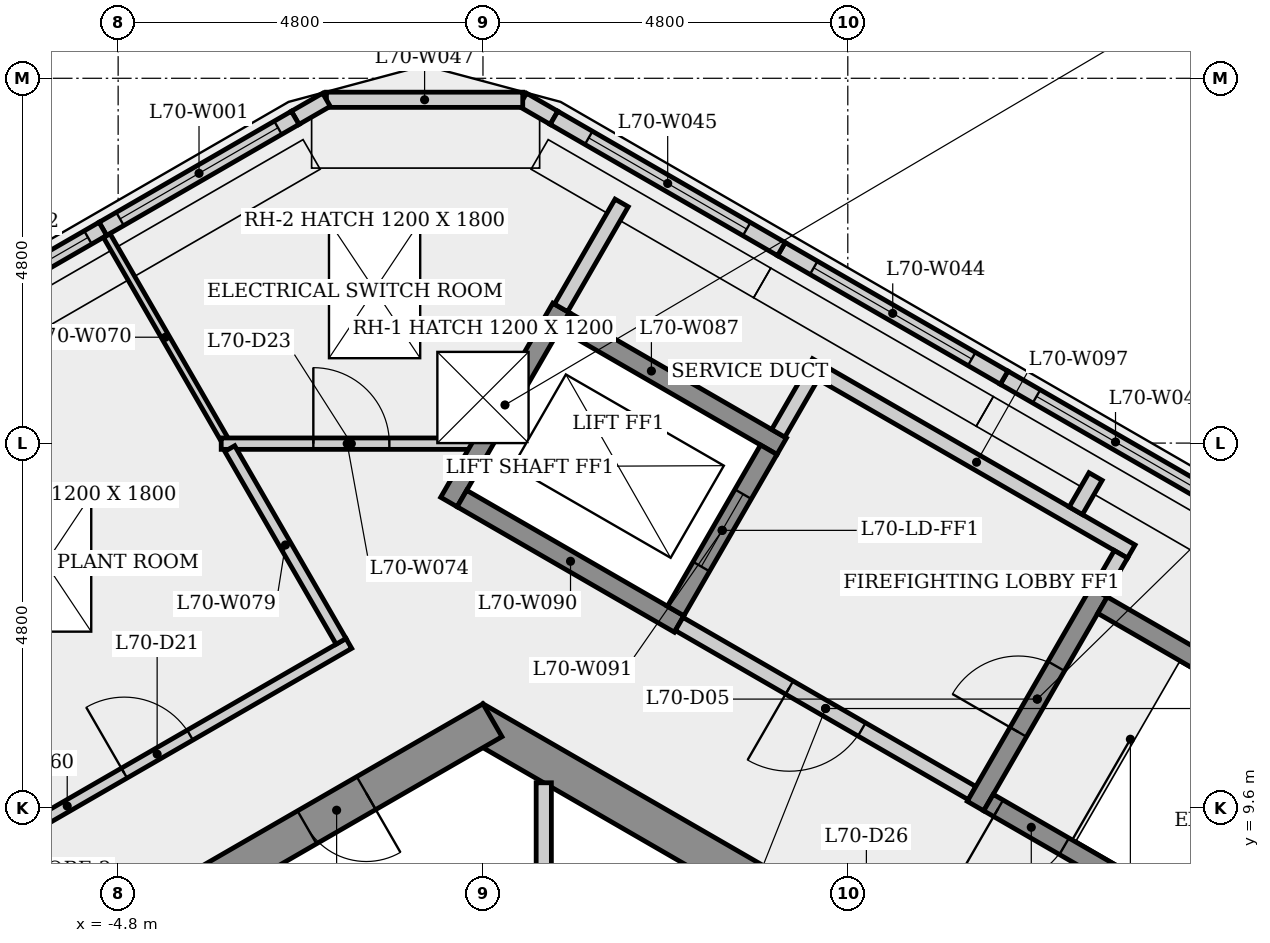
"""IFC4 building model, lengths in metres.
Left out: names, types, materials, properties, quantities, classifications, styles, units other than length and angle.
Written with IfcOpenShell. Run it as: python <this file> out.ifc"""

import sys

from ifc_helpers import new_model, si_unit, direction, frame, frame_2d, origin, origin_2d, place, context, subcontext, project, spatial, rectangle, extrude, element, fill, save


model = new_model("IFC4")
c1 = context("Model", 3, precision=1e-05, world=origin(), true_north=direction((0.0, 1.0)))
c2 = subcontext(c1, "Body", "Model", "MODEL_VIEW")
j1 = project(units=[si_unit("LENGTHUNIT", "METRE"), si_unit("PLANEANGLEUNIT", "RADIAN")], contexts=[c1])
p1 = place(None, origin())
s1 = spatial("IfcSite", under=j1, at=p1, CompositionType="ELEMENT")
p2 = place(p1, origin())
s2 = spatial("IfcBuilding", under=s1, at=p2, CompositionType="ELEMENT")
p3 = place(p2, frame((0.0, 0.0, 262.9)))
s3 = spatial("IfcBuildingStorey", under=s2, at=p3, CompositionType="ELEMENT", Elevation=262.9)
p4 = place(p3, frame((9.375, 5.268, 0.0), z_axis=(0.0, 0.0, 1.0), x_axis=(-0.866023993627, 0.500002442456, 0.0)))
e1 = element("IfcWall", 1, at=p4, inside=s3, PredefinedType="SHEAR", context=c2, shape_type="SweptSolid", body=[
    extrude(rectangle(XDim=10.97, YDim=0.5, at=frame_2d((5.485, 0.0))), origin(), (0.0, 0.0, 1.0), 4.8),
])
p5 = place(p4, frame((4.55, 0.0, 0.0)))
e2 = element("IfcOpeningElement", 2, at=p5, cuts=e1, PredefinedType="OPENING", context=c2, shape_type="SweptSolid", body=[
    extrude(rectangle(XDim=0.9, YDim=2.1, at=frame_2d((0.45, 1.05))), frame((0.0, 0.26, 0.0), z_axis=(0.0, -1.0, 0.0), x_axis=(1.0, 0.0, 0.0)), (0.0, 0.0, 1.0), 0.52),
])
p6 = place(p3, frame((0.125, 10.753, 0.0), z_axis=(0.0, 0.0, 1.0), x_axis=(-0.866023993627, -0.500002442456, 0.0)))
e3 = element("IfcWall", 3, at=p6, inside=s3, PredefinedType="SHEAR", context=c2, shape_type="SweptSolid", body=[
    extrude(rectangle(XDim=10.97, YDim=0.5, at=frame_2d((5.485, 0.0))), origin(), (0.0, 0.0, 1.0), 4.8),
])
p7 = place(p6, frame((7.113, 0.0, 0.0)))
e4 = element("IfcOpeningElement", 4, at=p7, cuts=e3, PredefinedType="OPENING", context=c2, shape_type="SweptSolid", body=[
    extrude(rectangle(XDim=0.9, YDim=2.1, at=frame_2d((0.45, 1.05))), frame((0.0, 0.26, 0.0), z_axis=(0.0, -1.0, 0.0), x_axis=(1.0, 0.0, 0.0)), (0.0, 0.0, 1.0), 0.52),
])
p8 = place(p6, frame((1.918, 0.0, 0.0)))
e5 = element("IfcOpeningElement", 5, at=p8, cuts=e3, PredefinedType="OPENING", context=c2, shape_type="SweptSolid", body=[
    extrude(rectangle(XDim=0.9, YDim=2.1, at=frame_2d((0.45, 1.05))), frame((0.0, 0.26, 0.0), z_axis=(0.0, -1.0, 0.0), x_axis=(1.0, 0.0, 0.0)), (0.0, 0.0, 1.0), 0.52),
])
p9 = place(p3, frame((-2.471, 18.68, 0.0), z_axis=(0.0, 0.0, 1.0), x_axis=(-0.866033925456, -0.499985239742, 0.0)))
e6 = element("IfcWall", 6, at=p9, inside=s3, PredefinedType="SOLIDWALL", context=c2, shape_type="SweptSolid", body=[
    extrude(rectangle(XDim=2.922, YDim=0.2, at=frame_2d((1.461, 0.0))), origin(), (0.0, 0.0, 1.0), 4.8),
])
p10 = place(p9, frame((0.261, 0.0, 0.8)))
e7 = element("IfcOpeningElement", 7, at=p10, cuts=e6, PredefinedType="OPENING", context=c2, shape_type="SweptSolid", body=[
    extrude(rectangle(XDim=2.4, YDim=2.4, at=frame_2d((1.2, 1.2))), frame((0.0, 0.11, 0.0), z_axis=(0.0, -1.0, 0.0), x_axis=(1.0, 0.0, 0.0)), (0.0, 0.0, 1.0), 0.22),
])
p11 = place(p3, frame((-5.001, 17.219, 0.0), z_axis=(0.0, 0.0, 1.0), x_axis=(-0.866027356191, -0.499996618317, 0.0)))
e8 = element("IfcWall", 8, at=p11, inside=s3, PredefinedType="SOLIDWALL", context=c2, shape_type="SweptSolid", body=[
    extrude(rectangle(XDim=2.852, YDim=0.2, at=frame_2d((1.426, 0.0))), origin(), (0.0, 0.0, 1.0), 4.8),
])
p12 = place(p11, frame((0.226, 0.0, 0.8)))
e9 = element("IfcOpeningElement", 9, at=p12, cuts=e8, PredefinedType="OPENING", context=c2, shape_type="SweptSolid", body=[
    extrude(rectangle(XDim=2.4, YDim=2.4, at=frame_2d((1.2, 1.2))), frame((0.0, 0.11, 0.0), z_axis=(0.0, -1.0, 0.0), x_axis=(1.0, 0.0, 0.0)), (0.0, 0.0, 1.0), 0.22),
])
p13 = place(p3, frame((9.788, 13.568, 0.0), z_axis=(0.0, 0.0, 1.0), x_axis=(-0.866051074803, 0.499955533855, 0.0)))
e10 = element("IfcWall", 10, at=p13, inside=s3, PredefinedType="SOLIDWALL", context=c2, shape_type="SweptSolid", body=[
    extrude(rectangle(XDim=3.385, YDim=0.2, at=frame_2d((1.692, 0.0))), origin(), (0.0, 0.0, 1.0), 4.8),
])
p14 = place(p13, frame((0.492, 0.0, 0.8)))
e11 = element("IfcOpeningElement", 11, at=p14, cuts=e10, PredefinedType="OPENING", context=c2, shape_type="SweptSolid", body=[
    extrude(rectangle(XDim=2.4, YDim=2.4, at=frame_2d((1.2, 1.2))), frame((0.0, 0.11, 0.0), z_axis=(0.0, -1.0, 0.0), x_axis=(1.0, 0.0, 0.0)), (0.0, 0.0, 1.0), 0.22),
])
p15 = place(p3, frame((6.856, 15.261, 0.0), z_axis=(0.0, 0.0, 1.0), x_axis=(-0.866010178455, 0.500026370116, 0.0)))
e12 = element("IfcWall", 12, at=p15, inside=s3, PredefinedType="SOLIDWALL", context=c2, shape_type="SweptSolid", body=[
    extrude(rectangle(XDim=3.384, YDim=0.2, at=frame_2d((1.692, 0.0))), origin(), (0.0, 0.0, 1.0), 4.8),
])
p16 = place(p15, frame((0.492, 0.0, 0.8)))
e13 = element("IfcOpeningElement", 13, at=p16, cuts=e12, PredefinedType="OPENING", context=c2, shape_type="SweptSolid", body=[
    extrude(rectangle(XDim=2.4, YDim=2.4, at=frame_2d((1.2, 1.2))), frame((0.0, 0.11, 0.0), z_axis=(0.0, -1.0, 0.0), x_axis=(1.0, 0.0, 0.0)), (0.0, 0.0, 1.0), 0.22),
])
p17 = place(p3, frame((3.926, 16.953, 0.0), z_axis=(0.0, 0.0, 1.0), x_axis=(-0.866046690806, 0.499963127985, 0.0)))
e14 = element("IfcWall", 14, at=p17, inside=s3, PredefinedType="SOLIDWALL", context=c2, shape_type="SweptSolid", body=[
    extrude(rectangle(XDim=3.454, YDim=0.2, at=frame_2d((1.727, 0.0))), origin(), (0.0, 0.0, 1.0), 4.8),
])
p18 = place(p17, frame((0.527, 0.0, 0.8)))
e15 = element("IfcOpeningElement", 15, at=p18, cuts=e14, PredefinedType="OPENING", context=c2, shape_type="SweptSolid", body=[
    extrude(rectangle(XDim=2.4, YDim=2.4, at=frame_2d((1.2, 1.2))), frame((0.0, 0.11, 0.0), z_axis=(0.0, -1.0, 0.0), x_axis=(1.0, 0.0, 0.0)), (0.0, 0.0, 1.0), 0.22),
])
p19 = place(p3, frame((0.935, 18.68, 0.0), z_axis=(0.0, 0.0, 1.0), x_axis=(-0.865988727248, 0.500063520245, 0.0)))
e16 = element("IfcWall", 16, at=p19, inside=s3, PredefinedType="SOLIDWALL", context=c2, shape_type="SweptSolid", body=[
    extrude(rectangle(XDim=0.475, YDim=0.2, at=frame_2d((0.238, 0.0))), origin(), (0.0, 0.0, 1.0), 4.8),
])
p20 = place(p3, frame((0.523, 18.917, 0.0), z_axis=(0.0, 0.0, 1.0), x_axis=(-1.0, 0.0, 0.0)))
e17 = element("IfcWall", 17, at=p20, inside=s3, PredefinedType="SOLIDWALL", context=c2, shape_type="SweptSolid", body=[
    extrude(rectangle(XDim=2.583, YDim=0.2, at=frame_2d((1.291, 0.0))), origin(), (0.0, 0.0, 1.0), 4.8),
])
p21 = place(p3, frame((-2.059, 18.917, 0.0), z_axis=(0.0, 0.0, 1.0), x_axis=(-0.865988727248, -0.500063520245, 0.0)))
e18 = element("IfcWall", 18, at=p21, inside=s3, PredefinedType="SOLIDWALL", context=c2, shape_type="SweptSolid", body=[
    extrude(rectangle(XDim=0.475, YDim=0.2, at=frame_2d((0.238, 0.0))), origin(), (0.0, 0.0, 1.0), 4.8),
])
p22 = place(p3, frame((-9.176, 7.485, 0.0), z_axis=(0.0, 0.0, 1.0), x_axis=(0.8660311782, 0.499989998285, 0.0)))
e19 = element("IfcWall", 19, at=p22, inside=s3, PredefinedType="PARTITIONING", context=c2, shape_type="SweptSolid", body=[
    extrude(rectangle(XDim=8.557, YDim=0.15, at=frame_2d((4.279, 0.0))), origin(), (0.0, 0.0, 1.0), 4.5),
])
p23 = place(p22, frame((5.145, 0.0, 0.0)))
e20 = element("IfcOpeningElement", 20, at=p23, cuts=e19, PredefinedType="OPENING", context=c2, shape_type="SweptSolid", body=[
    extrude(rectangle(XDim=1.0, YDim=2.1, at=frame_2d((0.5, 1.05))), frame((0.0, 0.085, 0.0), z_axis=(0.0, -1.0, 0.0), x_axis=(1.0, 0.0, 0.0)), (0.0, 0.0, 1.0), 0.17),
])
p24 = place(p3, frame((-4.949, 17.129, 0.0), z_axis=(0.0, 0.0, 1.0), x_axis=(0.499943966227, -0.866057752481, 0.0)))
e21 = element("IfcWall", 21, at=p24, inside=s3, PredefinedType="PARTITIONING", context=c2, shape_type="SweptSolid", body=[
    extrude(rectangle(XDim=3.085, YDim=0.1, at=frame_2d((1.542, 0.0))), origin(), (0.0, 0.0, 1.0), 4.5),
])
p25 = place(p3, frame((-3.444, 14.393, 0.0), z_axis=(0.0, 0.0, 1.0), x_axis=(1.0, 0.0, 0.0)))
e22 = element("IfcWall", 22, at=p25, inside=s3, PredefinedType="PARTITIONING", context=c2, shape_type="SweptSolid", body=[
    extrude(rectangle(XDim=3.314, YDim=0.15, at=frame_2d((1.657, 0.0))), origin(), (0.0, 0.0, 1.0), 4.5),
])
p26 = place(p25, frame((1.212, 0.0, 0.0)))
e23 = element("IfcOpeningElement", 23, at=p26, cuts=e22, PredefinedType="OPENING", context=c2, shape_type="SweptSolid", body=[
    extrude(rectangle(XDim=1.0, YDim=2.1, at=frame_2d((0.5, 1.05))), frame((0.0, 0.085, 0.0), z_axis=(0.0, -1.0, 0.0), x_axis=(1.0, 0.0, 0.0)), (0.0, 0.0, 1.0), 0.17),
])
p27 = place(p3, frame((-1.867, 11.791, 0.0), z_axis=(0.0, 0.0, 1.0), x_axis=(-0.499967823365, 0.866043980176, 0.0)))
e24 = element("IfcWall", 24, at=p27, inside=s3, PredefinedType="PARTITIONING", context=c2, shape_type="SweptSolid", body=[
    extrude(rectangle(XDim=2.928, YDim=0.15, at=frame_2d((1.464, 0.0))), origin(), (0.0, 0.0, 1.0), 4.5),
])
p28 = place(p3, frame((-0.448, 13.624, 0.0), z_axis=(0.0, 0.0, 1.0), x_axis=(0.500037662692, 0.866003658127, 0.0)))
e25 = element("IfcWall", 25, at=p28, inside=s3, PredefinedType="SHEAR", context=c2, shape_type="SweptSolid", body=[
    extrude(rectangle(XDim=2.95, YDim=0.25, at=frame_2d((1.475, 0.0))), origin(), (0.0, 0.0, 1.0), 4.5),
])
p29 = place(p3, frame((0.8, 9.93, 0.0), z_axis=(0.0, 0.0, 1.0), x_axis=(0.0, -1.0, 0.0)))
e26 = element("IfcWall", 26, at=p29, inside=s3, PredefinedType="PARTITIONING", context=c2, shape_type="SweptSolid", body=[
    extrude(rectangle(XDim=4.68, YDim=0.2, at=frame_2d((2.34, 0.0))), origin(), (0.0, 0.0, 1.0), 4.5),
])
p30 = place(p3, frame((1.027, 16.179, 0.0), z_axis=(0.0, 0.0, 1.0), x_axis=(0.500058204987, 0.865991796511, 0.0)))
e27 = element("IfcWall", 27, at=p30, inside=s3, PredefinedType="PLUMBINGWALL", context=c2, shape_type="SweptSolid", body=[
    extrude(rectangle(XDim=1.594, YDim=0.2, at=frame_2d((0.797, 0.0))), origin(), (0.0, 0.0, 1.0), 4.5),
])
for number, where, z_axis, x_axis in (
    (28, (1.073, 16.008, 0.0), (0.0, 0.0, 1.0), (0.866, -0.5, 0.0)),
    (29, (2.581, 12.02, 0.0), (0.0, 0.0, 1.0), (-0.866, 0.5, 0.0)),
):
    element("IfcWall", number, at=place(p3, frame(where, z_axis=z_axis, x_axis=x_axis)), inside=s3, PredefinedType="SHEAR", context=c2, shape_type="SweptSolid", body=[
        extrude(rectangle(XDim=3.3, YDim=0.25, at=frame_2d((1.65, 0.0))), origin(), (0.0, 0.0, 1.0), 4.5),
    ])
p31 = place(p3, frame((2.535, 12.191, 0.0), z_axis=(0.0, 0.0, 1.0), x_axis=(0.500061746146, 0.865989751695, 0.0)))
e30 = element("IfcWall", 30, at=p31, inside=s3, PredefinedType="SHEAR", context=c2, shape_type="SweptSolid", body=[
    extrude(rectangle(XDim=2.45, YDim=0.25, at=frame_2d((1.225, 0.0))), origin(), (0.0, 0.0, 1.0), 4.5),
])
p32 = place(p31, frame((0.675, 0.0, 0.0)))
e31 = element("IfcOpeningElement", 31, at=p32, cuts=e30, PredefinedType="OPENING", context=c2, shape_type="SweptSolid", body=[
    extrude(rectangle(XDim=1.1, YDim=2.1, at=frame_2d((0.55, 1.05))), frame((0.0, 0.135, 0.0), z_axis=(0.0, -1.0, 0.0), x_axis=(1.0, 0.0, 0.0)), (0.0, 0.0, 1.0), 0.27),
])
p33 = place(p3, frame((3.885, 14.529, 0.0), z_axis=(0.0, 0.0, 1.0), x_axis=(0.499997628298, 0.866026773083, 0.0)))
e32 = element("IfcWall", 32, at=p33, inside=s3, PredefinedType="PLUMBINGWALL", context=c2, shape_type="SweptSolid", body=[
    extrude(rectangle(XDim=1.075, YDim=0.2, at=frame_2d((0.538, 0.0))), origin(), (0.0, 0.0, 1.0), 4.5),
])
p34 = place(p3, frame((4.459, 15.323, 0.0), z_axis=(0.0, 0.0, 1.0), x_axis=(0.866016039709, -0.500016218704, 0.0)))
e33 = element("IfcWall", 33, at=p34, inside=s3, PredefinedType="PLUMBINGWALL", context=c2, shape_type="SweptSolid", body=[
    extrude(rectangle(XDim=4.7, YDim=0.2, at=frame_2d((2.35, 0.0))), origin(), (0.0, 0.0, 1.0), 4.5),
])
p35 = place(p3, frame((6.435, 9.795, 0.0), z_axis=(0.0, 0.0, 1.0), x_axis=(-0.866012907634, 0.500021643343, 0.0)))
e34 = element("IfcWall", 34, at=p35, inside=s3, PredefinedType="PARTITIONING", context=c2, shape_type="SweptSolid", body=[
    extrude(rectangle(XDim=4.45, YDim=0.2, at=frame_2d((2.225, 0.0))), origin(), (0.0, 0.0, 1.0), 4.5),
])
p36 = place(p35, frame((1.675, 0.0, 0.0)))
e35 = element("IfcOpeningElement", 35, at=p36, cuts=e34, PredefinedType="OPENING", context=c2, shape_type="SweptSolid", body=[
    extrude(rectangle(XDim=1.1, YDim=2.1, at=frame_2d((0.55, 1.05))), frame((0.0, 0.11, 0.0), z_axis=(0.0, -1.0, 0.0), x_axis=(1.0, 0.0, 0.0)), (0.0, 0.0, 1.0), 0.22),
])
p37 = place(p3, frame((6.48, 9.624, 0.0), z_axis=(0.0, 0.0, 1.0), x_axis=(0.500017246033, 0.866015446554, 0.0)))
e36 = element("IfcWall", 36, at=p37, inside=s3, PredefinedType="SHEAR", context=c2, shape_type="SweptSolid", body=[
    extrude(rectangle(XDim=3.25, YDim=0.25, at=frame_2d((1.625, 0.0))), origin(), (0.0, 0.0, 1.0), 4.5),
])
p38 = place(p37, frame((1.125, 0.0, 0.0)))
e37 = element("IfcOpeningElement", 37, at=p38, cuts=e36, PredefinedType="OPENING", context=c2, shape_type="SweptSolid", body=[
    extrude(rectangle(XDim=1.0, YDim=2.1, at=frame_2d((0.5, 1.05))), frame((0.0, 0.135, 0.0), z_axis=(0.0, -1.0, 0.0), x_axis=(1.0, 0.0, 0.0)), (0.0, 0.0, 1.0), 0.27),
])
p39 = place(p3, frame((7.8, 13.51, 0.0), z_axis=(0.0, 0.0, 1.0), x_axis=(0.499980071345, 0.866036909293, 0.0)))
e38 = element("IfcWall", 38, at=p39, inside=s3, PredefinedType="PLUMBINGWALL", context=c2, shape_type="SweptSolid", body=[
    extrude(rectangle(XDim=0.52, YDim=0.2, at=frame_2d((0.26, 0.0))), origin(), (0.0, 0.0, 1.0), 4.5),
])
p40 = place(p3, frame((8.151, 12.268, 0.0), z_axis=(0.0, 0.0, 1.0), x_axis=(0.866025499775, -0.499999833739, 0.0)))
e39 = element("IfcWall", 39, at=p40, inside=s3, PredefinedType="SHEAR", context=c2, shape_type="SweptSolid", body=[
    extrude(rectangle(XDim=6.4, YDim=0.25, at=frame_2d((3.2, 0.0))), origin(), (0.0, 0.0, 1.0), 4.5),
])
p41 = place(p3, frame((8.393, 12.937, 0.0), z_axis=(0.0, 0.0, 1.0), x_axis=(-0.500065409566, -0.86598763626, 0.0)))
e40 = element("IfcWall", 40, at=p41, inside=s3, PredefinedType="PLUMBINGWALL", context=c2, shape_type="SweptSolid", body=[
    extrude(rectangle(XDim=0.575, YDim=0.2, at=frame_2d((0.288, 0.0))), origin(), (0.0, 0.0, 1.0), 4.5),
])
p42 = place(p3, frame((12.194, 6.47, 0.0), z_axis=(0.0, 0.0, 1.0), x_axis=(-0.866025499775, 0.499999833739, 0.0)))
e41 = element("IfcWall", 41, at=p42, inside=s3, PredefinedType="SHEAR", context=c2, shape_type="SweptSolid", body=[
    extrude(rectangle(XDim=6.4, YDim=0.25, at=frame_2d((3.2, 0.0))), origin(), (0.0, 0.0, 1.0), 4.5),
])
p43 = place(p42, frame((5.25, 0.0, 0.0)))
e42 = element("IfcOpeningElement", 42, at=p43, cuts=e41, PredefinedType="OPENING", context=c2, shape_type="SweptSolid", body=[
    extrude(rectangle(XDim=1.0, YDim=2.1, at=frame_2d((0.5, 1.05))), frame((0.0, 0.135, 0.0), z_axis=(0.0, -1.0, 0.0), x_axis=(1.0, 0.0, 0.0)), (0.0, 0.0, 1.0), 0.27),
])
p44 = place(p10, origin())
e43 = element("IfcWindow", 43, at=p44, inside=s3, PartitioningType="SINGLE_PANEL", PredefinedType="WINDOW", context=c2, shape_type="SweptSolid", body=[
    extrude(rectangle(XDim=2.4, YDim=2.4, at=frame_2d((1.2, 1.2))), frame((0.0, 0.03, 0.0), z_axis=(0.0, -1.0, 0.0), x_axis=(1.0, 0.0, 0.0)), (0.0, 0.0, 1.0), 0.06),
])
fill(e7, e43)
p45 = place(p12, origin())
e44 = element("IfcWindow", 44, at=p45, inside=s3, PartitioningType="SINGLE_PANEL", PredefinedType="WINDOW", context=c2, shape_type="SweptSolid", body=[
    extrude(rectangle(XDim=2.4, YDim=2.4, at=frame_2d((1.2, 1.2))), frame((0.0, 0.03, 0.0), z_axis=(0.0, -1.0, 0.0), x_axis=(1.0, 0.0, 0.0)), (0.0, 0.0, 1.0), 0.06),
])
fill(e9, e44)
p46 = place(p14, origin())
e45 = element("IfcWindow", 45, at=p46, inside=s3, PartitioningType="SINGLE_PANEL", PredefinedType="WINDOW", context=c2, shape_type="SweptSolid", body=[
    extrude(rectangle(XDim=2.4, YDim=2.4, at=frame_2d((1.2, 1.2))), frame((0.0, 0.03, 0.0), z_axis=(0.0, -1.0, 0.0), x_axis=(1.0, 0.0, 0.0)), (0.0, 0.0, 1.0), 0.06),
])
fill(e11, e45)
p47 = place(p16, origin())
e46 = element("IfcWindow", 46, at=p47, inside=s3, PartitioningType="SINGLE_PANEL", PredefinedType="WINDOW", context=c2, shape_type="SweptSolid", body=[
    extrude(rectangle(XDim=2.4, YDim=2.4, at=frame_2d((1.2, 1.2))), frame((0.0, 0.03, 0.0), z_axis=(0.0, -1.0, 0.0), x_axis=(1.0, 0.0, 0.0)), (0.0, 0.0, 1.0), 0.06),
])
fill(e13, e46)
p48 = place(p18, origin())
e47 = element("IfcWindow", 47, at=p48, inside=s3, PartitioningType="SINGLE_PANEL", PredefinedType="WINDOW", context=c2, shape_type="SweptSolid", body=[
    extrude(rectangle(XDim=2.4, YDim=2.4, at=frame_2d((1.2, 1.2))), frame((0.0, 0.03, 0.0), z_axis=(0.0, -1.0, 0.0), x_axis=(1.0, 0.0, 0.0)), (0.0, 0.0, 1.0), 0.06),
])
fill(e15, e47)
p49 = place(p2, frame((0.0, 0.0, 267.7)))
p50 = place(p49, origin())
p51 = place(p50, frame((0.0, 15.0, -0.01)))
p52 = place(p51, frame((0.0, 0.0, 0.26)))
e48 = element("IfcWindow", 48, at=p52, inside=s3, PartitioningType="SINGLE_PANEL", PredefinedType="SKYLIGHT", context=c2, shape_type="SweptSolid", body=[
    extrude(rectangle(XDim=1.2, YDim=1.2, at=origin_2d()), origin(), (0.0, 0.0, 1.0), 0.05),
])
p53 = place(p50, frame((-5.754, 12.819, -0.01)))
p54 = place(p53, frame((0.0, 0.0, 0.26)))
e49 = element("IfcWindow", 49, at=p54, inside=s3, PartitioningType="SINGLE_PANEL", PredefinedType="SKYLIGHT", context=c2, shape_type="SweptSolid", body=[
    extrude(rectangle(XDim=1.8, YDim=1.2, at=origin_2d()), origin(), (0.0, 0.0, 1.0), 0.05),
])
p55 = place(p50, frame((-1.426, 16.417, -0.01)))
p56 = place(p55, frame((0.0, 0.0, 0.26)))
e50 = element("IfcWindow", 50, at=p56, inside=s3, PartitioningType="SINGLE_PANEL", PredefinedType="SKYLIGHT", context=c2, shape_type="SweptSolid", body=[
    extrude(rectangle(XDim=1.8, YDim=1.2, at=origin_2d()), origin(), (0.0, 0.0, 1.0), 0.05),
])
p57 = place(p43, origin())
e51 = element("IfcDoor", 51, at=p57, inside=s3, OperationType="SINGLE_SWING_RIGHT", PredefinedType="DOOR", context=c2, shape_type="SweptSolid", body=[
    extrude(rectangle(XDim=1.0, YDim=2.1, at=frame_2d((0.5, 1.05))), frame((0.0, 0.025, 0.0), z_axis=(0.0, -1.0, 0.0), x_axis=(1.0, 0.0, 0.0)), (0.0, 0.0, 1.0), 0.05),
])
fill(e42, e51)
p58 = place(p38, origin())
e52 = element("IfcDoor", 52, at=p58, inside=s3, OperationType="SINGLE_SWING_LEFT", PredefinedType="DOOR", context=c2, shape_type="SweptSolid", body=[
    extrude(rectangle(XDim=1.0, YDim=2.1, at=frame_2d((0.5, 1.05))), frame((0.0, 0.025, 0.0), z_axis=(0.0, -1.0, 0.0), x_axis=(1.0, 0.0, 0.0)), (0.0, 0.0, 1.0), 0.05),
])
fill(e37, e52)
p59 = place(p36, origin())
e53 = element("IfcDoor", 53, at=p59, inside=s3, OperationType="SINGLE_SWING_RIGHT", PredefinedType="DOOR", context=c2, shape_type="SweptSolid", body=[
    extrude(rectangle(XDim=1.1, YDim=2.1, at=frame_2d((0.55, 1.05))), frame((0.0, 0.025, 0.0), z_axis=(0.0, -1.0, 0.0), x_axis=(1.0, 0.0, 0.0)), (0.0, 0.0, 1.0), 0.05),
])
fill(e35, e53)
p60 = place(p32, origin())
e54 = element("IfcDoor", 54, at=p60, inside=s3, OperationType="SLIDING_TO_LEFT", PredefinedType="DOOR", context=c2, shape_type="SweptSolid", body=[
    extrude(rectangle(XDim=1.1, YDim=2.1, at=frame_2d((0.55, 1.05))), frame((0.0, 0.025, 0.0), z_axis=(0.0, -1.0, 0.0), x_axis=(1.0, 0.0, 0.0)), (0.0, 0.0, 1.0), 0.05),
])
fill(e31, e54)
p61 = place(p23, origin())
e55 = element("IfcDoor", 55, at=p61, inside=s3, OperationType="SINGLE_SWING_LEFT", PredefinedType="DOOR", context=c2, shape_type="SweptSolid", body=[
    extrude(rectangle(XDim=1.0, YDim=2.1, at=frame_2d((0.5, 1.05))), frame((0.0, 0.025, 0.0), z_axis=(0.0, -1.0, 0.0), x_axis=(1.0, 0.0, 0.0)), (0.0, 0.0, 1.0), 0.05),
])
fill(e20, e55)
p62 = place(p26, origin())
e56 = element("IfcDoor", 56, at=p62, inside=s3, OperationType="SINGLE_SWING_LEFT", PredefinedType="DOOR", context=c2, shape_type="SweptSolid", body=[
    extrude(rectangle(XDim=1.0, YDim=2.1, at=frame_2d((0.5, 1.05))), frame((0.0, 0.025, 0.0), z_axis=(0.0, -1.0, 0.0), x_axis=(1.0, 0.0, 0.0)), (0.0, 0.0, 1.0), 0.05),
])
fill(e23, e56)
p63 = place(p8, origin())
e57 = element("IfcDoor", 57, at=p63, inside=s3, OperationType="SINGLE_SWING_LEFT", PredefinedType="DOOR", context=c2, shape_type="SweptSolid", body=[
    extrude(rectangle(XDim=0.9, YDim=2.1, at=frame_2d((0.45, 1.05))), frame((0.0, 0.025, 0.0), z_axis=(0.0, -1.0, 0.0), x_axis=(1.0, 0.0, 0.0)), (0.0, 0.0, 1.0), 0.05),
])
fill(e5, e57)
save(model, sys.argv[1])
